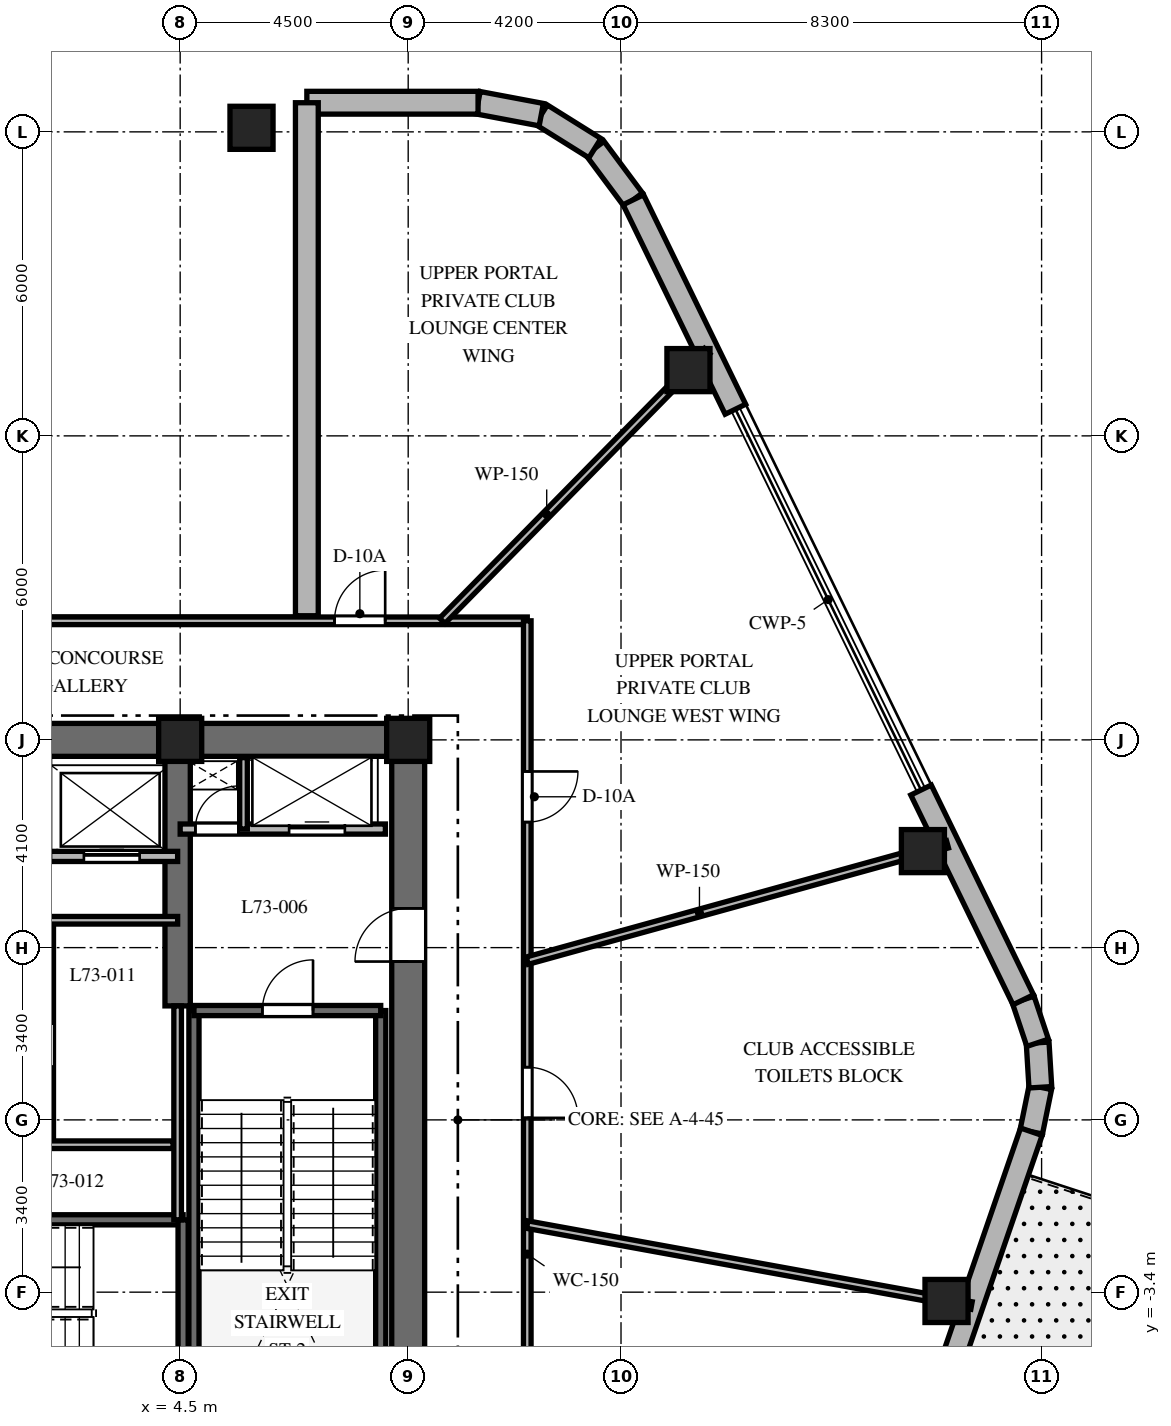
"""IFC4 building model, lengths in metres.
Left out: names, types, materials, properties, quantities, classifications, styles, units other than length and angle.
Written with IfcOpenShell. Run it as: python <this file> out.ifc"""

import sys

from ifc_helpers import new_model, si_unit, direction, frame, frame_2d, origin, origin_2d, place, context, subcontext, project, spatial, rectangle, extrude, element, fill, save


model = new_model("IFC4")
c1 = context("Model", 3, precision=1e-05, world=origin(), true_north=direction((0.0, 1.0)))
c2 = subcontext(c1, "Body", "Model", "MODEL_VIEW")
j1 = project(units=[si_unit("LENGTHUNIT", "METRE"), si_unit("PLANEANGLEUNIT", "RADIAN")], contexts=[c1])
p1 = place(None, origin())
s1 = spatial("IfcSite", under=j1, at=p1, CompositionType="ELEMENT")
p2 = place(p1, origin())
s2 = spatial("IfcBuilding", under=s1, at=p2, CompositionType="ELEMENT")
p3 = place(p2, frame((0.0, 0.0, 293.1)))
s3 = spatial("IfcBuildingStorey", under=s2, at=p3, CompositionType="ELEMENT", Elevation=293.1)
p4 = place(p3, frame((1.85, 7.5, 0.0), z_axis=(0.0, 0.0, 1.0), x_axis=(1.0, 0.0, 0.0)))
e1 = element("IfcWall", 1, at=p4, inside=s3, PredefinedType="SHEAR", context=c2, shape_type="SweptSolid", body=[
    extrude(rectangle(XDim=7.475, YDim=0.65, at=frame_2d((3.737, 0.0))), origin(), (0.0, 0.0, 1.0), 4.5),
])
p5 = place(p3, frame((9.0, -7.175, 0.0), z_axis=(0.0, 0.0, 1.0), x_axis=(0.0, 1.0, 0.0)))
e2 = element("IfcWall", 2, at=p5, inside=s3, PredefinedType="SHEAR", context=c2, shape_type="SweptSolid", body=[
    extrude(rectangle(XDim=14.35, YDim=0.65, at=frame_2d((7.175, 0.0))), origin(), (0.0, 0.0, 1.0), 4.5),
])
p6 = place(p5, frame((10.3, 0.0, 0.0)))
e3 = element("IfcOpeningElement", 3, at=p6, cuts=e2, PredefinedType="OPENING", context=c2, shape_type="SweptSolid", body=[
    extrude(rectangle(XDim=1.05, YDim=2.15, at=frame_2d((0.525, 1.075))), frame((0.0, 0.335, 0.0), z_axis=(0.0, -1.0, 0.0), x_axis=(1.0, 0.0, 0.0)), (0.0, 0.0, 1.0), 0.67),
])
p7 = place(p3, frame((4.45, 2.25, 0.0), z_axis=(0.0, 0.0, 1.0), x_axis=(0.0, 1.0, 0.0)))
e4 = element("IfcWall", 4, at=p7, inside=s3, PredefinedType="SHEAR", context=c2, shape_type="SweptSolid", body=[
    extrude(rectangle(XDim=4.925, YDim=0.5, at=frame_2d((2.462, 0.0))), origin(), (0.0, 0.0, 1.0), 4.5),
])
for number, where, z_axis, x_axis in (
    (5, (4.772, -6.985, 0.0), (0.0, 0.0, 1.0), (0.0, 1.0, 0.0)),
    (6, (8.458, -6.985, 0.0), (0.0, 0.0, 1.0), (0.0, 1.0, 0.0)),
):
    element("IfcWall", number, at=place(p3, frame(where, z_axis=z_axis, x_axis=x_axis)), inside=s3, PredefinedType="SHEAR", context=c2, shape_type="SweptSolid", body=[
        extrude(rectangle(XDim=9.143, YDim=0.2, at=frame_2d((4.572, 0.0))), origin(), (0.0, 0.0, 1.0), 4.5),
    ])
p8 = place(p3, frame((4.772, 2.158, 0.0), z_axis=(0.0, 0.0, 1.0), x_axis=(1.0, 0.0, 0.0)))
e7 = element("IfcWall", 7, at=p8, inside=s3, PredefinedType="SHEAR", context=c2, shape_type="SweptSolid", body=[
    extrude(rectangle(XDim=3.686, YDim=0.2, at=frame_2d((1.843, 0.0))), origin(), (0.0, 0.0, 1.0), 4.5),
])
p9 = place(p8, frame((1.35, 0.0, 0.0)))
e8 = element("IfcOpeningElement", 8, at=p9, cuts=e7, PredefinedType="OPENING", context=c2, shape_type="SweptSolid", body=[
    extrude(rectangle(XDim=1.0, YDim=2.15, at=frame_2d((0.5, 1.075))), frame((0.0, 0.11, 0.0), z_axis=(0.0, -1.0, 0.0), x_axis=(1.0, 0.0, 0.0)), (0.0, 0.0, 1.0), 0.22),
])
p10 = place(p3, frame((-4.608, -1.972, 0.0), z_axis=(0.0, 0.0, 1.0), x_axis=(1.0, 0.0, 0.0)))
e9 = element("IfcWall", 9, at=p10, inside=s3, PredefinedType="SHEAR", context=c2, shape_type="SweptSolid", body=[
    extrude(rectangle(XDim=9.166, YDim=0.2, at=frame_2d((4.583, 0.0))), origin(), (0.0, 0.0, 1.0), 4.5),
])
p11 = place(p3, frame((4.558, -5.658, 0.0), z_axis=(0.0, 0.0, 1.0), x_axis=(0.0, 1.0, 0.0)))
e10 = element("IfcWall", 10, at=p11, inside=s3, PredefinedType="SHEAR", context=c2, shape_type="SweptSolid", body=[
    extrude(rectangle(XDim=3.686, YDim=0.2, at=frame_2d((1.843, 0.0))), origin(), (0.0, 0.0, 1.0), 4.5),
])
for number, where, z_axis, x_axis in (
    (11, (9.0, 7.5, 0.0), (0.0, 0.0, 1.0), (1.0, 0.0, 0.0)),
    (12, (4.5, 7.5, 0.0), (0.0, 0.0, 1.0), (1.0, 0.0, 0.0)),
    (13, (19.624, -3.574, 0.0), (0.0, 0.0, 1.0), (1.0, 0.0, 0.0)),
    (14, (19.158, 5.305, 0.0), (0.0, 0.0, 1.0), (1.0, 0.0, 0.0)),
    (15, (14.531, 14.798, 0.0), (0.0, 0.0, 1.0), (1.0, 0.0, 0.0)),
    (16, (5.908, 19.58, 0.0), (0.0, 0.0, 1.0), (1.0, 0.0, 0.0)),
):
    element("IfcColumn", number, at=place(p3, frame(where, z_axis=z_axis, x_axis=x_axis)), inside=s3, PredefinedType="COLUMN", context=c2, shape_type="SweptSolid", body=[
        extrude(rectangle(XDim=0.85, YDim=0.85, at=origin_2d()), origin(), (0.0, 0.0, 1.0), 4.5),
    ])
p12 = place(p3, frame((21.298, -0.233, 0.0), z_axis=(0.0, 0.0, 1.0), x_axis=(0.199158176661, 0.979967356941, 0.0)))
e17 = element("IfcWall", 17, at=p12, inside=s3, PredefinedType="SOLIDWALL", context=c2, shape_type="SweptSolid", body=[
    extrude(rectangle(XDim=0.895, YDim=0.45, at=frame_2d((0.447, 0.0))), origin(), (0.0, 0.0, 1.0), 4.18),
])
p13 = place(p3, frame((21.476, 0.644, 0.0), z_axis=(0.0, 0.0, 1.0), x_axis=(-0.061031097918, 0.998135865044, 0.0)))
e18 = element("IfcWall", 18, at=p13, inside=s3, PredefinedType="SOLIDWALL", context=c2, shape_type="SweptSolid", body=[
    extrude(rectangle(XDim=0.88, YDim=0.45, at=frame_2d((0.44, 0.0))), origin(), (0.0, 0.0, 1.0), 4.18),
])
p14 = place(p3, frame((21.422, 1.522, 0.0), z_axis=(0.0, 0.0, 1.0), x_axis=(-0.316964162323, 0.94843751497, 0.0)))
e19 = element("IfcWall", 19, at=p14, inside=s3, PredefinedType="SOLIDWALL", context=c2, shape_type="SweptSolid", body=[
    extrude(rectangle(XDim=0.895, YDim=0.45, at=frame_2d((0.448, 0.0))), origin(), (0.0, 0.0, 1.0), 4.18),
])
p15 = place(p3, frame((13.443, 18.16, 0.0), z_axis=(0.0, 0.0, 1.0), x_axis=(-0.597042425808, 0.802209661987, 0.0)))
e20 = element("IfcWall", 20, at=p15, inside=s3, PredefinedType="SOLIDWALL", context=c2, shape_type="SweptSolid", body=[
    extrude(rectangle(XDim=1.27, YDim=0.45, at=frame_2d((0.635, 0.0))), origin(), (0.0, 0.0, 1.0), 4.18),
])
p16 = place(p3, frame((12.685, 19.178, 0.0), z_axis=(0.0, 0.0, 1.0), x_axis=(-0.848031272749, 0.529946186362, 0.0)))
e21 = element("IfcWall", 21, at=p16, inside=s3, PredefinedType="SOLIDWALL", context=c2, shape_type="SweptSolid", body=[
    extrude(rectangle(XDim=1.248, YDim=0.45, at=frame_2d((0.624, 0.0))), origin(), (0.0, 0.0, 1.0), 4.18),
])
p17 = place(p3, frame((11.626, 19.84, 0.0), z_axis=(0.0, 0.0, 1.0), x_axis=(-0.982701956681, 0.185194126083, 0.0)))
e22 = element("IfcWall", 22, at=p17, inside=s3, PredefinedType="SOLIDWALL", context=c2, shape_type="SweptSolid", body=[
    extrude(rectangle(XDim=1.27, YDim=0.45, at=frame_2d((0.635, 0.0))), origin(), (0.0, 0.0, 1.0), 4.18),
])
p18 = place(p3, frame((19.734, -4.775, 0.0), z_axis=(0.0, 0.0, 1.0), x_axis=(0.325437701015, 0.945563484256, 0.0)))
e23 = element("IfcWall", 23, at=p18, inside=s3, PredefinedType="SOLIDWALL", context=c2, shape_type="SweptSolid", body=[
    extrude(rectangle(XDim=4.803, YDim=0.45, at=frame_2d((2.402, 0.0))), origin(), (0.0, 0.0, 1.0), 4.18),
])
p19 = place(p3, frame((21.138, 2.371, 0.0), z_axis=(0.0, 0.0, 1.0), x_axis=(-0.438135313339, 0.898909031663, 0.0)))
e24 = element("IfcWall", 24, at=p19, inside=s3, PredefinedType="SOLIDWALL", context=c2, shape_type="SweptSolid", body=[
    extrude(rectangle(XDim=4.605, YDim=0.45, at=frame_2d((2.302, 0.0))), origin(), (0.0, 0.0, 1.0), 4.18),
])
p20 = place(p3, frame((15.458, 14.026, 0.0), z_axis=(0.0, 0.0, 1.0), x_axis=(-0.438101439155, 0.898925541416, 0.0)))
e25 = element("IfcWall", 25, at=p20, inside=s3, PredefinedType="SOLIDWALL", context=c2, shape_type="SweptSolid", body=[
    extrude(rectangle(XDim=4.599, YDim=0.45, at=frame_2d((2.299, 0.0))), origin(), (0.0, 0.0, 1.0), 4.18),
])
p21 = place(p3, frame((10.379, 20.075, 0.0), z_axis=(0.0, 0.0, 1.0), x_axis=(-1.0, 0.0, 0.0)))
e26 = element("IfcWall", 26, at=p21, inside=s3, PredefinedType="SOLIDWALL", context=c2, shape_type="SweptSolid", body=[
    extrude(rectangle(XDim=3.379, YDim=0.45, at=frame_2d((1.689, 0.0))), origin(), (0.0, 0.0, 1.0), 4.18),
])
p22 = place(p3, frame((7.0, 9.95, 0.0), z_axis=(0.0, 0.0, 1.0), x_axis=(0.0, 1.0, 0.0)))
e27 = element("IfcWall", 27, at=p22, inside=s3, PredefinedType="SOLIDWALL", context=c2, shape_type="SweptSolid", body=[
    extrude(rectangle(XDim=10.125, YDim=0.45, at=frame_2d((5.062, 0.0))), origin(), (0.0, 0.0, 1.0), 4.18),
])
p23 = place(p3, frame((4.5, 5.74, 0.0), z_axis=(0.0, 0.0, 1.0), x_axis=(1.0, 0.0, 0.0)))
e28 = element("IfcWall", 28, at=p23, inside=s3, PredefinedType="PARTITIONING", context=c2, shape_type="SweptSolid", body=[
    extrude(rectangle(XDim=4.05, YDim=0.2, at=frame_2d((2.025, 0.0))), origin(), (0.0, 0.0, 1.0), 4.18),
])
p24 = place(p23, frame((0.3, 0.0, 0.0)))
e29 = element("IfcOpeningElement", 29, at=p24, cuts=e28, PredefinedType="OPENING", context=c2, shape_type="SweptSolid", body=[
    extrude(rectangle(XDim=0.85, YDim=2.03, at=frame_2d((0.425, 1.015))), frame((0.0, 0.11, 0.0), z_axis=(0.0, -1.0, 0.0), x_axis=(1.0, 0.0, 0.0)), (0.0, 0.0, 1.0), 0.22),
])
p25 = place(p23, frame((2.15, 0.0, 0.0)))
e30 = element("IfcOpeningElement", 30, at=p25, cuts=e28, PredefinedType="OPENING", context=c2, shape_type="SweptSolid", body=[
    extrude(rectangle(XDim=1.1, YDim=2.2, at=frame_2d((0.55, 1.1))), frame((0.0, 0.11, 0.0), z_axis=(0.0, -1.0, 0.0), x_axis=(1.0, 0.0, 0.0)), (0.0, 0.0, 1.0), 0.22),
])
p26 = place(p3, frame((5.75, 5.74, 0.0), z_axis=(0.0, 0.0, 1.0), x_axis=(0.0, 1.0, 0.0)))
e31 = element("IfcWall", 31, at=p26, inside=s3, PredefinedType="PARTITIONING", context=c2, shape_type="SweptSolid", body=[
    extrude(rectangle(XDim=1.41, YDim=0.15, at=frame_2d((0.705, 0.0))), origin(), (0.0, 0.0, 1.0), 4.18),
])
p27 = place(p3, frame((1.85, 5.2, 0.0), z_axis=(0.0, 0.0, 1.0), x_axis=(1.0, 0.0, 0.0)))
e32 = element("IfcWall", 32, at=p27, inside=s3, PredefinedType="PARTITIONING", context=c2, shape_type="SweptSolid", body=[
    extrude(rectangle(XDim=2.6, YDim=0.2, at=frame_2d((1.3, 0.0))), origin(), (0.0, 0.0, 1.0), 4.18),
])
p28 = place(p27, frame((0.75, 0.0, 0.0)))
e33 = element("IfcOpeningElement", 33, at=p28, cuts=e32, PredefinedType="OPENING", context=c2, shape_type="SweptSolid", body=[
    extrude(rectangle(XDim=1.1, YDim=2.2, at=frame_2d((0.55, 1.1))), frame((0.0, 0.11, 0.0), z_axis=(0.0, -1.0, 0.0), x_axis=(1.0, 0.0, 0.0)), (0.0, 0.0, 1.0), 0.22),
])
p29 = place(p3, frame((4.45, -1.972, 0.0), z_axis=(0.0, 0.0, 1.0), x_axis=(0.0, 1.0, 0.0)))
e34 = element("IfcWall", 34, at=p29, inside=s3, PredefinedType="PARTITIONING", context=c2, shape_type="SweptSolid", body=[
    extrude(rectangle(XDim=4.222, YDim=0.15, at=frame_2d((2.111, 0.0))), origin(), (0.0, 0.0, 1.0), 4.18),
])
p30 = place(p3, frame((1.9, -0.5, 0.0), z_axis=(0.0, 0.0, 1.0), x_axis=(0.0, 1.0, 0.0)))
e35 = element("IfcWall", 35, at=p30, inside=s3, PredefinedType="PARTITIONING", context=c2, shape_type="SweptSolid", body=[
    extrude(rectangle(XDim=4.44, YDim=0.2, at=frame_2d((2.22, 0.0))), origin(), (0.0, 0.0, 1.0), 4.18),
])
p31 = place(p30, frame((1.55, 0.0, 0.0)))
e36 = element("IfcOpeningElement", 36, at=p31, cuts=e35, PredefinedType="OPENING", context=c2, shape_type="SweptSolid", body=[
    extrude(rectangle(XDim=0.85, YDim=2.03, at=frame_2d((0.425, 1.015))), frame((0.0, 0.11, 0.0), z_axis=(0.0, -1.0, 0.0), x_axis=(1.0, 0.0, 0.0)), (0.0, 0.0, 1.0), 0.22),
])
p32 = place(p3, frame((1.9, 3.94, 0.0), z_axis=(0.0, 0.0, 1.0), x_axis=(1.0, 0.0, 0.0)))
e37 = element("IfcWall", 37, at=p32, inside=s3, PredefinedType="PARTITIONING", context=c2, shape_type="SweptSolid", body=[
    extrude(rectangle(XDim=2.55, YDim=0.15, at=frame_2d((1.275, 0.0))), origin(), (0.0, 0.0, 1.0), 4.18),
])
p33 = place(p3, frame((-4.36, -0.49, 0.0), z_axis=(0.0, 0.0, 1.0), x_axis=(1.0, 0.0, 0.0)))
e38 = element("IfcWall", 38, at=p33, inside=s3, PredefinedType="PARTITIONING", context=c2, shape_type="SweptSolid", body=[
    extrude(rectangle(XDim=8.72, YDim=0.15, at=frame_2d((4.36, 0.0))), origin(), (0.0, 0.0, 1.0), 4.18),
])
p34 = place(p33, frame((3.86, 0.0, 0.0)))
e39 = element("IfcOpeningElement", 39, at=p34, cuts=e38, PredefinedType="OPENING", context=c2, shape_type="SweptSolid", body=[
    extrude(rectangle(XDim=0.9, YDim=2.03, at=frame_2d((0.45, 1.015))), frame((0.0, 0.085, 0.0), z_axis=(0.0, -1.0, 0.0), x_axis=(1.0, 0.0, 0.0)), (0.0, 0.0, 1.0), 0.17),
])
p35 = place(p3, frame((-11.35, 9.85, 0.0), z_axis=(0.0, 0.0, 1.0), x_axis=(1.0, 0.0, 0.0)))
e40 = element("IfcWall", 40, at=p35, inside=s3, PredefinedType="PARTITIONING", context=c2, shape_type="SweptSolid", body=[
    extrude(rectangle(XDim=22.7, YDim=0.15, at=frame_2d((11.35, 0.0))), origin(), (0.0, 0.0, 1.0), 3.67),
])
p36 = place(p35, frame((18.896, 0.0, 0.0)))
e41 = element("IfcOpeningElement", 41, at=p36, cuts=e40, PredefinedType="OPENING", context=c2, shape_type="SweptSolid", body=[
    extrude(rectangle(XDim=1.0, YDim=2.03, at=frame_2d((0.5, 1.015))), frame((0.0, 0.085, 0.0), z_axis=(0.0, -1.0, 0.0), x_axis=(1.0, 0.0, 0.0)), (0.0, 0.0, 1.0), 0.17),
])
p37 = place(p3, frame((11.35, 9.85, 0.0), z_axis=(0.0, 0.0, 1.0), x_axis=(0.0, -1.0, 0.0)))
e42 = element("IfcWall", 42, at=p37, inside=s3, PredefinedType="PARTITIONING", context=c2, shape_type="SweptSolid", body=[
    extrude(rectangle(XDim=19.7, YDim=0.15, at=frame_2d((9.85, 0.0))), origin(), (0.0, 0.0, 1.0), 3.67),
])
p38 = place(p37, frame((2.973, 0.0, 0.0)))
e43 = element("IfcOpeningElement", 43, at=p38, cuts=e42, PredefinedType="OPENING", context=c2, shape_type="SweptSolid", body=[
    extrude(rectangle(XDim=1.0, YDim=2.03, at=frame_2d((0.5, 1.015))), frame((0.0, 0.085, 0.0), z_axis=(0.0, -1.0, 0.0), x_axis=(1.0, 0.0, 0.0)), (0.0, 0.0, 1.0), 0.17),
])
p39 = place(p37, frame((15.189, 0.0, 0.0)))
e44 = element("IfcOpeningElement", 44, at=p39, cuts=e42, PredefinedType="OPENING", context=c2, shape_type="SweptSolid", body=[
    extrude(rectangle(XDim=1.0, YDim=2.03, at=frame_2d((0.5, 1.015))), frame((0.0, 0.085, 0.0), z_axis=(0.0, -1.0, 0.0), x_axis=(1.0, 0.0, 0.0)), (0.0, 0.0, 1.0), 0.17),
])
p40 = place(p37, frame((8.81, 0.0, 0.0)))
e45 = element("IfcOpeningElement", 45, at=p40, cuts=e42, PredefinedType="OPENING", context=c2, shape_type="SweptSolid", body=[
    extrude(rectangle(XDim=1.0, YDim=2.03, at=frame_2d((0.5, 1.015))), frame((0.0, 0.085, 0.0), z_axis=(0.0, -1.0, 0.0), x_axis=(1.0, 0.0, 0.0)), (0.0, 0.0, 1.0), 0.17),
])
p41 = place(p3, frame((11.35, 3.143, 0.0), z_axis=(0.0, 0.0, 1.0), x_axis=(0.963731818141, 0.266872596386, 0.0)))
e46 = element("IfcWall", 46, at=p41, inside=s3, PredefinedType="PARTITIONING", context=c2, shape_type="SweptSolid", body=[
    extrude(rectangle(XDim=8.605, YDim=0.15, at=frame_2d((4.302, 0.0))), origin(), (0.0, 0.0, 1.0), 3.52),
])
p42 = place(p3, frame((9.672, 9.85, 0.0), z_axis=(0.0, 0.0, 1.0), x_axis=(0.700629771301, 0.713524998558, 0.0)))
e47 = element("IfcWall", 47, at=p42, inside=s3, PredefinedType="PARTITIONING", context=c2, shape_type="SweptSolid", body=[
    extrude(rectangle(XDim=7.459, YDim=0.15, at=frame_2d((3.73, 0.0))), origin(), (0.0, 0.0, 1.0), 3.52),
])
p43 = place(p3, frame((11.35, -2.067, 0.0), z_axis=(0.0, 0.0, 1.0), x_axis=(0.983816386236, -0.179179569634, 0.0)))
e48 = element("IfcWall", 48, at=p43, inside=s3, PredefinedType="PARTITIONING", context=c2, shape_type="SweptSolid", body=[
    extrude(rectangle(XDim=8.911, YDim=0.15, at=frame_2d((4.456, 0.0))), origin(), (0.0, 0.0, 1.0), 3.52),
])
p44 = place(p9, origin())
e49 = element("IfcDoor", 49, at=p44, inside=s3, OperationType="SINGLE_SWING_RIGHT", PredefinedType="DOOR", context=c2, shape_type="SweptSolid", body=[
    extrude(rectangle(XDim=1.0, YDim=2.15, at=frame_2d((0.5, 1.075))), frame((0.0, 0.025, 0.0), z_axis=(0.0, -1.0, 0.0), x_axis=(1.0, 0.0, 0.0)), (0.0, 0.0, 1.0), 0.05),
])
fill(e8, e49)
p45 = place(p6, origin())
e50 = element("IfcDoor", 50, at=p45, inside=s3, OperationType="SINGLE_SWING_LEFT", PredefinedType="DOOR", context=c2, shape_type="SweptSolid", body=[
    extrude(rectangle(XDim=1.05, YDim=2.15, at=frame_2d((0.525, 1.075))), frame((0.0, 0.025, 0.0), z_axis=(0.0, -1.0, 0.0), x_axis=(1.0, 0.0, 0.0)), (0.0, 0.0, 1.0), 0.05),
])
fill(e3, e50)
p46 = place(p24, origin())
e51 = element("IfcDoor", 51, at=p46, inside=s3, OperationType="SINGLE_SWING_RIGHT", PredefinedType="DOOR", context=c2, shape_type="SweptSolid", body=[
    extrude(rectangle(XDim=0.85, YDim=2.03, at=frame_2d((0.425, 1.015))), frame((0.0, 0.025, 0.0), z_axis=(0.0, -1.0, 0.0), x_axis=(1.0, 0.0, 0.0)), (0.0, 0.0, 1.0), 0.05),
])
fill(e29, e51)
p47 = place(p25, origin())
e52 = element("IfcDoor", 52, at=p47, inside=s3, OperationType="SLIDING_TO_RIGHT", PredefinedType="DOOR", context=c2, shape_type="SweptSolid", body=[
    extrude(rectangle(XDim=1.1, YDim=2.2, at=frame_2d((0.55, 1.1))), frame((0.0, 0.025, 0.0), z_axis=(0.0, -1.0, 0.0), x_axis=(1.0, 0.0, 0.0)), (0.0, 0.0, 1.0), 0.05),
])
fill(e30, e52)
p48 = place(p28, origin())
e53 = element("IfcDoor", 53, at=p48, inside=s3, OperationType="SLIDING_TO_RIGHT", PredefinedType="DOOR", context=c2, shape_type="SweptSolid", body=[
    extrude(rectangle(XDim=1.1, YDim=2.2, at=frame_2d((0.55, 1.1))), frame((0.0, 0.025, 0.0), z_axis=(0.0, -1.0, 0.0), x_axis=(1.0, 0.0, 0.0)), (0.0, 0.0, 1.0), 0.05),
])
fill(e33, e53)
p49 = place(p38, origin())
e54 = element("IfcDoor", 54, at=p49, inside=s3, OperationType="SINGLE_SWING_LEFT", PredefinedType="DOOR", context=c2, shape_type="SweptSolid", body=[
    extrude(rectangle(XDim=1.0, YDim=2.03, at=frame_2d((0.5, 1.015))), frame((0.0, 0.025, 0.0), z_axis=(0.0, -1.0, 0.0), x_axis=(1.0, 0.0, 0.0)), (0.0, 0.0, 1.0), 0.05),
])
fill(e43, e54)
p50 = place(p36, origin())
e55 = element("IfcDoor", 55, at=p50, inside=s3, OperationType="SINGLE_SWING_RIGHT", PredefinedType="DOOR", context=c2, shape_type="SweptSolid", body=[
    extrude(rectangle(XDim=1.0, YDim=2.03, at=frame_2d((0.5, 1.015))), frame((0.0, 0.025, 0.0), z_axis=(0.0, -1.0, 0.0), x_axis=(1.0, 0.0, 0.0)), (0.0, 0.0, 1.0), 0.05),
])
fill(e41, e55)
p51 = place(p40, origin())
e56 = element("IfcDoor", 56, at=p51, inside=s3, OperationType="SINGLE_SWING_RIGHT", PredefinedType="DOOR", context=c2, shape_type="SweptSolid", body=[
    extrude(rectangle(XDim=1.0, YDim=2.03, at=frame_2d((0.5, 1.015))), frame((0.0, 0.025, 0.0), z_axis=(0.0, -1.0, 0.0), x_axis=(1.0, 0.0, 0.0)), (0.0, 0.0, 1.0), 0.05),
])
fill(e45, e56)
save(model, sys.argv[1])
